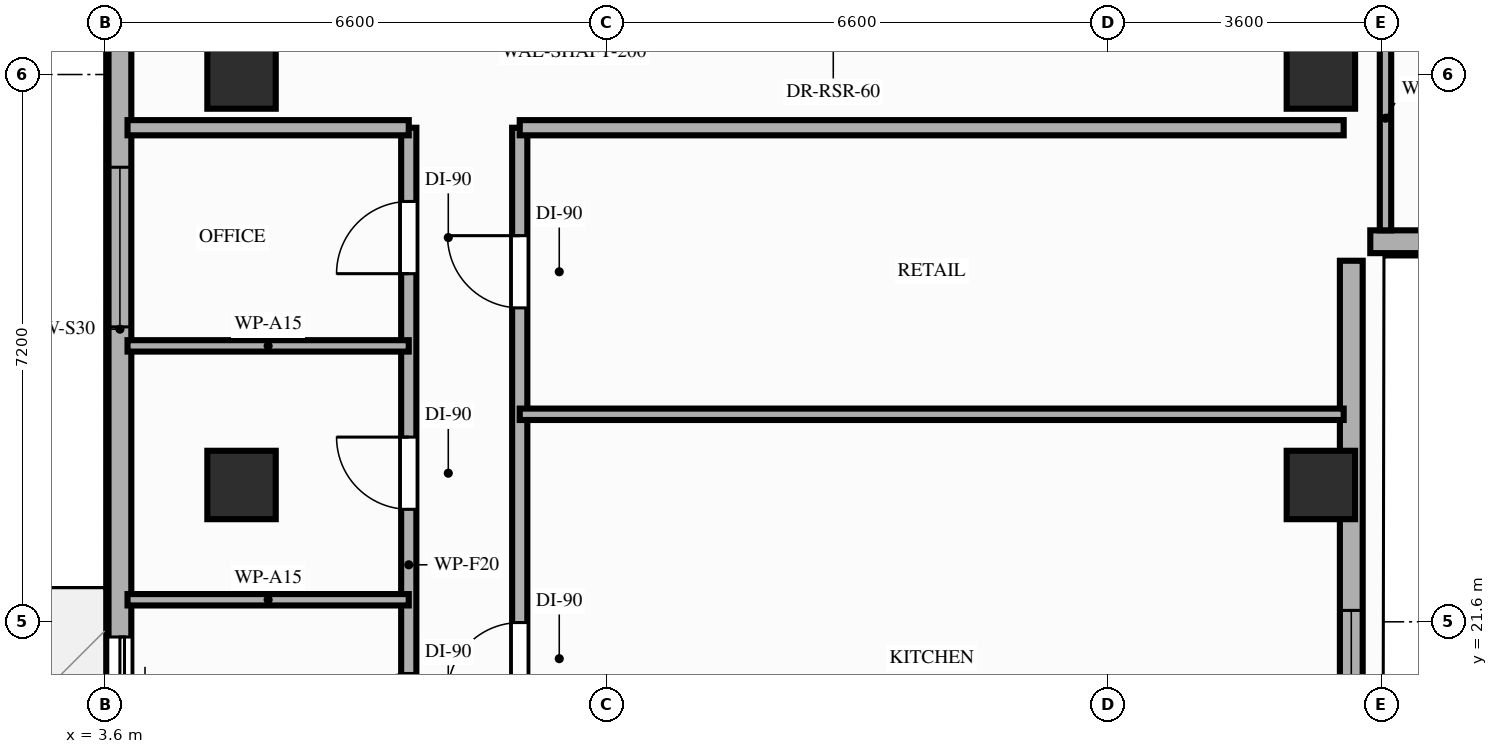
"""IFC4 building model, lengths in metres.
Left out: names, types, materials, properties, quantities, classifications, styles, units other than length and angle.
Written with IfcOpenShell. Run it as: python <this file> out.ifc"""

import sys

from ifc_helpers import new_model, si_unit, direction, frame, frame_2d, origin, origin_2d, place, context, subcontext, project, spatial, rectangle, extrude, element, fill, save


model = new_model("IFC4")
c1 = context("Model", 3, precision=1e-05, world=origin(), true_north=direction((0.0, 1.0)))
c2 = subcontext(c1, "Body", "Model", "MODEL_VIEW")
j1 = project(units=[si_unit("LENGTHUNIT", "METRE"), si_unit("PLANEANGLEUNIT", "RADIAN")], contexts=[c1])
p1 = place(None, origin())
s1 = spatial("IfcSite", under=j1, at=p1, CompositionType="ELEMENT")
p2 = place(p1, origin())
s2 = spatial("IfcBuilding", under=s1, at=p2, CompositionType="ELEMENT")
p3 = place(p2, frame((0.0, 0.0, 179.2)))
s3 = spatial("IfcBuildingStorey", under=s2, at=p3, CompositionType="ELEMENT", Elevation=179.2)
for number, where, z_axis, x_axis in (
    (1, (5.4, 23.4, 0.0), (0.0, 0.0, 1.0), (1.0, 0.0, 0.0)),
    (2, (19.6, 23.4, 0.0), (0.0, 0.0, 1.0), (1.0, 0.0, 0.0)),
    (3, (5.4, 28.8, 0.0), (0.0, 0.0, 1.0), (1.0, 0.0, 0.0)),
    (4, (19.6, 28.8, 0.0), (0.0, 0.0, 1.0), (1.0, 0.0, 0.0)),
):
    element("IfcColumn", number, at=place(p3, frame(where, z_axis=z_axis, x_axis=x_axis)), inside=s3, PredefinedType="COLUMN", context=c2, shape_type="SweptSolid", body=[
        extrude(rectangle(XDim=0.9, YDim=0.9, at=origin_2d()), origin(), (0.0, 0.0, 1.0), 3.2),
    ])
p4 = place(p3, frame((3.8, 42.1, 0.0), z_axis=(0.0, 0.0, 1.0), x_axis=(0.0, -1.0, 0.0)))
e5 = element("IfcWall", 5, at=p4, inside=s3, PredefinedType="STANDARD", context=c2, shape_type="SweptSolid", body=[
    extrude(rectangle(XDim=33.3, YDim=0.3, at=frame_2d((16.65, 0.0))), origin(), (0.0, 0.0, 1.0), 2.71),
])
p5 = place(p4, frame((20.7, 0.0, 0.0)))
e6 = element("IfcOpeningElement", 6, at=p5, cuts=e5, PredefinedType="OPENING", context=c2, shape_type="SweptSolid", body=[
    extrude(rectangle(XDim=1.4, YDim=2.1, at=frame_2d((0.7, 1.05))), frame((0.0, 0.16, 0.0), z_axis=(0.0, -1.0, 0.0), x_axis=(1.0, 0.0, 0.0)), (0.0, 0.0, 1.0), 0.32),
])
p6 = place(p4, frame((28.28, 0.0, 0.85)))
e7 = element("IfcOpeningElement", 7, at=p6, cuts=e5, PredefinedType="OPENING", context=c2, shape_type="SweptSolid", body=[
    extrude(rectangle(XDim=2.1, YDim=1.61, at=frame_2d((1.05, 0.805))), frame((0.0, 0.16, 0.0), z_axis=(0.0, -1.0, 0.0), x_axis=(1.0, 0.0, 0.0)), (0.0, 0.0, 1.0), 0.32),
])
p7 = place(p4, frame((25.75, 0.0, 0.85)))
e8 = element("IfcOpeningElement", 8, at=p7, cuts=e5, PredefinedType="OPENING", context=c2, shape_type="SweptSolid", body=[
    extrude(rectangle(XDim=2.1, YDim=1.61, at=frame_2d((1.05, 0.805))), frame((0.0, 0.16, 0.0), z_axis=(0.0, -1.0, 0.0), x_axis=(1.0, 0.0, 0.0)), (0.0, 0.0, 1.0), 0.32),
])
p8 = place(p4, frame((14.52, 0.0, 0.85)))
e9 = element("IfcOpeningElement", 9, at=p8, cuts=e5, PredefinedType="OPENING", context=c2, shape_type="SweptSolid", body=[
    extrude(rectangle(XDim=2.1, YDim=1.61, at=frame_2d((1.05, 0.805))), frame((0.0, 0.16, 0.0), z_axis=(0.0, -1.0, 0.0), x_axis=(1.0, 0.0, 0.0)), (0.0, 0.0, 1.0), 0.32),
])
p9 = place(p4, frame((9.75, 0.0, 0.85)))
e10 = element("IfcOpeningElement", 10, at=p9, cuts=e5, PredefinedType="OPENING", context=c2, shape_type="SweptSolid", body=[
    extrude(rectangle(XDim=2.1, YDim=1.61, at=frame_2d((1.05, 0.805))), frame((0.0, 0.16, 0.0), z_axis=(0.0, -1.0, 0.0), x_axis=(1.0, 0.0, 0.0)), (0.0, 0.0, 1.0), 0.32),
])
p10 = place(p4, frame((3.65, 0.0, 0.85)))
e11 = element("IfcOpeningElement", 11, at=p10, cuts=e5, PredefinedType="OPENING", context=c2, shape_type="SweptSolid", body=[
    extrude(rectangle(XDim=2.1, YDim=1.61, at=frame_2d((1.05, 0.805))), frame((0.0, 0.16, 0.0), z_axis=(0.0, -1.0, 0.0), x_axis=(1.0, 0.0, 0.0)), (0.0, 0.0, 1.0), 0.32),
])
p11 = place(p3, frame((20.0, 8.8, 0.0), z_axis=(0.0, 0.0, 1.0), x_axis=(0.0, 1.0, 0.0)))
e12 = element("IfcWall", 12, at=p11, inside=s3, PredefinedType="STANDARD", context=c2, shape_type="SweptSolid", body=[
    extrude(rectangle(XDim=17.55, YDim=0.3, at=frame_2d((8.775, 0.0))), origin(), (0.0, 0.0, 1.0), 2.45),
])
p12 = place(p11, frame((5.12, 0.0, 0.85)))
e13 = element("IfcOpeningElement", 13, at=p12, cuts=e12, PredefinedType="OPENING", context=c2, shape_type="SweptSolid", body=[
    extrude(rectangle(XDim=2.1, YDim=1.35, at=frame_2d((1.05, 0.675))), frame((0.0, 0.16, 0.0), z_axis=(0.0, -1.0, 0.0), x_axis=(1.0, 0.0, 0.0)), (0.0, 0.0, 1.0), 0.32),
])
p13 = place(p11, frame((10.85, 0.0, 0.85)))
e14 = element("IfcOpeningElement", 14, at=p13, cuts=e12, PredefinedType="OPENING", context=c2, shape_type="SweptSolid", body=[
    extrude(rectangle(XDim=2.1, YDim=1.35, at=frame_2d((1.05, 0.675))), frame((0.0, 0.16, 0.0), z_axis=(0.0, -1.0, 0.0), x_axis=(1.0, 0.0, 0.0)), (0.0, 0.0, 1.0), 0.32),
])
p14 = place(p3, frame((20.25, 26.6, 0.0), z_axis=(0.0, 0.0, 1.0), x_axis=(1.0, 0.0, 0.0)))
e15 = element("IfcWall", 15, at=p14, inside=s3, PredefinedType="STANDARD", context=c2, shape_type="SweptSolid", body=[
    extrude(rectangle(XDim=21.35, YDim=0.3, at=frame_2d((10.675, 0.0))), origin(), (0.0, 0.0, 1.0), 2.71),
])
p15 = place(p14, frame((7.95, 0.0, 0.0)))
e16 = element("IfcOpeningElement", 16, at=p15, cuts=e15, PredefinedType="OPENING", context=c2, shape_type="SweptSolid", body=[
    extrude(rectangle(XDim=1.4, YDim=2.1, at=frame_2d((0.7, 1.05))), frame((0.0, 0.16, 0.0), z_axis=(0.0, -1.0, 0.0), x_axis=(1.0, 0.0, 0.0)), (0.0, 0.0, 1.0), 0.32),
])
p16 = place(p14, frame((17.73, 0.0, 0.85)))
e17 = element("IfcOpeningElement", 17, at=p16, cuts=e15, PredefinedType="OPENING", context=c2, shape_type="SweptSolid", body=[
    extrude(rectangle(XDim=2.1, YDim=1.61, at=frame_2d((1.05, 0.805))), frame((0.0, 0.16, 0.0), z_axis=(0.0, -1.0, 0.0), x_axis=(1.0, 0.0, 0.0)), (0.0, 0.0, 1.0), 0.32),
])
p17 = place(p14, frame((2.1, 0.0, 0.85)))
e18 = element("IfcOpeningElement", 18, at=p17, cuts=e15, PredefinedType="OPENING", context=c2, shape_type="SweptSolid", body=[
    extrude(rectangle(XDim=2.1, YDim=1.61, at=frame_2d((1.05, 0.805))), frame((0.0, 0.16, 0.0), z_axis=(0.0, -1.0, 0.0), x_axis=(1.0, 0.0, 0.0)), (0.0, 0.0, 1.0), 0.32),
])
p18 = place(p14, frame((13.5, 0.0, 0.85)))
e19 = element("IfcOpeningElement", 19, at=p18, cuts=e15, PredefinedType="OPENING", context=c2, shape_type="SweptSolid", body=[
    extrude(rectangle(XDim=2.1, YDim=1.61, at=frame_2d((1.05, 0.805))), frame((0.0, 0.16, 0.0), z_axis=(0.0, -1.0, 0.0), x_axis=(1.0, 0.0, 0.0)), (0.0, 0.0, 1.0), 0.32),
])
p19 = place(p3, frame((7.6, 16.6, 0.0), z_axis=(0.0, 0.0, 1.0), x_axis=(0.0, 1.0, 0.0)))
e20 = element("IfcWall", 20, at=p19, inside=s3, PredefinedType="PARTITIONING", context=c2, shape_type="SweptSolid", body=[
    extrude(rectangle(XDim=11.5, YDim=0.2, at=frame_2d((5.75, 0.0))), origin(), (0.0, 0.0, 1.0), 2.45),
])
p20 = place(p19, frame((0.73, 0.0, 0.0)))
e21 = element("IfcOpeningElement", 21, at=p20, cuts=e20, PredefinedType="OPENING", context=c2, shape_type="SweptSolid", body=[
    extrude(rectangle(XDim=0.95, YDim=2.15, at=frame_2d((0.475, 1.075))), frame((0.0, 0.11, 0.0), z_axis=(0.0, -1.0, 0.0), x_axis=(1.0, 0.0, 0.0)), (0.0, 0.0, 1.0), 0.22),
])
p21 = place(p19, frame((3.37, 0.0, 0.0)))
e22 = element("IfcOpeningElement", 22, at=p21, cuts=e20, PredefinedType="OPENING", context=c2, shape_type="SweptSolid", body=[
    extrude(rectangle(XDim=0.95, YDim=2.15, at=frame_2d((0.475, 1.075))), frame((0.0, 0.11, 0.0), z_axis=(0.0, -1.0, 0.0), x_axis=(1.0, 0.0, 0.0)), (0.0, 0.0, 1.0), 0.22),
])
p22 = place(p19, frame((6.48, 0.0, 0.0)))
e23 = element("IfcOpeningElement", 23, at=p22, cuts=e20, PredefinedType="OPENING", context=c2, shape_type="SweptSolid", body=[
    extrude(rectangle(XDim=0.95, YDim=2.15, at=frame_2d((0.475, 1.075))), frame((0.0, 0.11, 0.0), z_axis=(0.0, -1.0, 0.0), x_axis=(1.0, 0.0, 0.0)), (0.0, 0.0, 1.0), 0.22),
])
p23 = place(p19, frame((9.58, 0.0, 0.0)))
e24 = element("IfcOpeningElement", 24, at=p23, cuts=e20, PredefinedType="OPENING", context=c2, shape_type="SweptSolid", body=[
    extrude(rectangle(XDim=0.95, YDim=2.15, at=frame_2d((0.475, 1.075))), frame((0.0, 0.11, 0.0), z_axis=(0.0, -1.0, 0.0), x_axis=(1.0, 0.0, 0.0)), (0.0, 0.0, 1.0), 0.22),
])
p24 = place(p3, frame((9.06, 16.6, 0.0), z_axis=(0.0, 0.0, 1.0), x_axis=(0.0, 1.0, 0.0)))
e25 = element("IfcWall", 25, at=p24, inside=s3, PredefinedType="PARTITIONING", context=c2, shape_type="SweptSolid", body=[
    extrude(rectangle(XDim=11.5, YDim=0.2, at=frame_2d((5.75, 0.0))), origin(), (0.0, 0.0, 1.0), 2.45),
])
p25 = place(p24, frame((0.24, 0.0, 0.0)))
e26 = element("IfcOpeningElement", 26, at=p25, cuts=e25, PredefinedType="OPENING", context=c2, shape_type="SweptSolid", body=[
    extrude(rectangle(XDim=0.95, YDim=2.1, at=frame_2d((0.475, 1.05))), frame((0.0, 0.11, 0.0), z_axis=(0.0, -1.0, 0.0), x_axis=(1.0, 0.0, 0.0)), (0.0, 0.0, 1.0), 0.22),
])
p26 = place(p24, frame((4.04, 0.0, 0.0)))
e27 = element("IfcOpeningElement", 27, at=p26, cuts=e25, PredefinedType="OPENING", context=c2, shape_type="SweptSolid", body=[
    extrude(rectangle(XDim=0.95, YDim=2.15, at=frame_2d((0.475, 1.075))), frame((0.0, 0.11, 0.0), z_axis=(0.0, -1.0, 0.0), x_axis=(1.0, 0.0, 0.0)), (0.0, 0.0, 1.0), 0.22),
])
p27 = place(p24, frame((9.13, 0.0, 0.0)))
e28 = element("IfcOpeningElement", 28, at=p27, cuts=e25, PredefinedType="OPENING", context=c2, shape_type="SweptSolid", body=[
    extrude(rectangle(XDim=0.95, YDim=2.15, at=frame_2d((0.475, 1.075))), frame((0.0, 0.11, 0.0), z_axis=(0.0, -1.0, 0.0), x_axis=(1.0, 0.0, 0.0)), (0.0, 0.0, 1.0), 0.22),
])
p28 = place(p3, frame((3.9, 28.1, 0.0), z_axis=(0.0, 0.0, 1.0), x_axis=(1.0, 0.0, 0.0)))
e29 = element("IfcWall", 29, at=p28, inside=s3, PredefinedType="PARTITIONING", context=c2, shape_type="SweptSolid", body=[
    extrude(rectangle(XDim=3.7, YDim=0.2, at=frame_2d((1.85, 0.0))), origin(), (0.0, 0.0, 1.0), 2.45),
])
p29 = place(p3, frame((9.06, 28.1, 0.0), z_axis=(0.0, 0.0, 1.0), x_axis=(1.0, 0.0, 0.0)))
e30 = element("IfcWall", 30, at=p29, inside=s3, PredefinedType="PARTITIONING", context=c2, shape_type="SweptSolid", body=[
    extrude(rectangle(XDim=10.84, YDim=0.2, at=frame_2d((5.42, 0.0))), origin(), (0.0, 0.0, 1.0), 2.45),
])
p30 = place(p3, frame((20.45, 26.75, 0.0), z_axis=(0.0, 0.0, 1.0), x_axis=(0.0, 1.0, 0.0)))
e31 = element("IfcWall", 31, at=p30, inside=s3, PredefinedType="PARTITIONING", context=c2, shape_type="SweptSolid", body=[
    extrude(rectangle(XDim=2.95, YDim=0.15, at=frame_2d((1.475, 0.0))), origin(), (0.0, 0.0, 1.0), 2.45),
])
for number, where, z_axis, x_axis in (
    (32, (3.9, 21.89, 0.0), (0.0, 0.0, 1.0), (1.0, 0.0, 0.0)),
    (33, (3.9, 25.23, 0.0), (0.0, 0.0, 1.0), (1.0, 0.0, 0.0)),
):
    element("IfcWall", number, at=place(p3, frame(where, z_axis=z_axis, x_axis=x_axis)), inside=s3, PredefinedType="PARTITIONING", context=c2, shape_type="SweptSolid", body=[
        extrude(rectangle(XDim=3.7, YDim=0.15, at=frame_2d((1.85, 0.0))), origin(), (0.0, 0.0, 1.0), 2.45),
    ])
p31 = place(p3, frame((9.06, 24.33, 0.0), z_axis=(0.0, 0.0, 1.0), x_axis=(1.0, 0.0, 0.0)))
e34 = element("IfcWall", 34, at=p31, inside=s3, PredefinedType="PARTITIONING", context=c2, shape_type="SweptSolid", body=[
    extrude(rectangle(XDim=10.84, YDim=0.15, at=frame_2d((5.42, 0.0))), origin(), (0.0, 0.0, 1.0), 2.45),
])
p32 = place(p5, origin())
e35 = element("IfcDoor", 35, at=p32, inside=s3, OperationType="SLIDING_TO_RIGHT", PredefinedType="DOOR", context=c2, shape_type="SweptSolid", body=[
    extrude(rectangle(XDim=1.4, YDim=2.1, at=frame_2d((0.7, 1.05))), frame((0.0, 0.025, 0.0), z_axis=(0.0, -1.0, 0.0), x_axis=(1.0, 0.0, 0.0)), (0.0, 0.0, 1.0), 0.05),
])
fill(e6, e35)
p33 = place(p8, origin())
e36 = element("IfcWindow", 36, at=p33, inside=s3, PartitioningType="SINGLE_PANEL", PredefinedType="WINDOW", context=c2, shape_type="SweptSolid", body=[
    extrude(rectangle(XDim=2.1, YDim=1.61, at=frame_2d((1.05, 0.805))), frame((0.0, 0.03, 0.0), z_axis=(0.0, -1.0, 0.0), x_axis=(1.0, 0.0, 0.0)), (0.0, 0.0, 1.0), 0.06),
])
fill(e9, e36)
p34 = place(p13, origin())
e37 = element("IfcWindow", 37, at=p34, inside=s3, PartitioningType="SINGLE_PANEL", PredefinedType="WINDOW", context=c2, shape_type="SweptSolid", body=[
    extrude(rectangle(XDim=2.1, YDim=1.35, at=frame_2d((1.05, 0.675))), frame((0.0, 0.03, 0.0), z_axis=(0.0, -1.0, 0.0), x_axis=(1.0, 0.0, 0.0)), (0.0, 0.0, 1.0), 0.06),
])
fill(e14, e37)
p35 = place(p21, origin())
e38 = element("IfcDoor", 38, at=p35, inside=s3, OperationType="SINGLE_SWING_LEFT", PredefinedType="DOOR", context=c2, shape_type="SweptSolid", body=[
    extrude(rectangle(XDim=0.95, YDim=2.15, at=frame_2d((0.475, 1.075))), frame((0.0, 0.025, 0.0), z_axis=(0.0, -1.0, 0.0), x_axis=(1.0, 0.0, 0.0)), (0.0, 0.0, 1.0), 0.05),
])
fill(e22, e38)
p36 = place(p22, origin())
e39 = element("IfcDoor", 39, at=p36, inside=s3, OperationType="SINGLE_SWING_RIGHT", PredefinedType="DOOR", context=c2, shape_type="SweptSolid", body=[
    extrude(rectangle(XDim=0.95, YDim=2.15, at=frame_2d((0.475, 1.075))), frame((0.0, 0.025, 0.0), z_axis=(0.0, -1.0, 0.0), x_axis=(1.0, 0.0, 0.0)), (0.0, 0.0, 1.0), 0.05),
])
fill(e23, e39)
p37 = place(p23, origin())
e40 = element("IfcDoor", 40, at=p37, inside=s3, OperationType="SINGLE_SWING_LEFT", PredefinedType="DOOR", context=c2, shape_type="SweptSolid", body=[
    extrude(rectangle(XDim=0.95, YDim=2.15, at=frame_2d((0.475, 1.075))), frame((0.0, 0.025, 0.0), z_axis=(0.0, -1.0, 0.0), x_axis=(1.0, 0.0, 0.0)), (0.0, 0.0, 1.0), 0.05),
])
fill(e24, e40)
p38 = place(p26, origin())
e41 = element("IfcDoor", 41, at=p38, inside=s3, OperationType="SINGLE_SWING_LEFT", PredefinedType="DOOR", context=c2, shape_type="SweptSolid", body=[
    extrude(rectangle(XDim=0.95, YDim=2.15, at=frame_2d((0.475, 1.075))), frame((0.0, 0.025, 0.0), z_axis=(0.0, -1.0, 0.0), x_axis=(1.0, 0.0, 0.0)), (0.0, 0.0, 1.0), 0.05),
])
fill(e27, e41)
p39 = place(p27, origin())
e42 = element("IfcDoor", 42, at=p39, inside=s3, OperationType="SINGLE_SWING_RIGHT", PredefinedType="DOOR", context=c2, shape_type="SweptSolid", body=[
    extrude(rectangle(XDim=0.95, YDim=2.15, at=frame_2d((0.475, 1.075))), frame((0.0, 0.025, 0.0), z_axis=(0.0, -1.0, 0.0), x_axis=(1.0, 0.0, 0.0)), (0.0, 0.0, 1.0), 0.05),
])
fill(e28, e42)
save(model, sys.argv[1])
